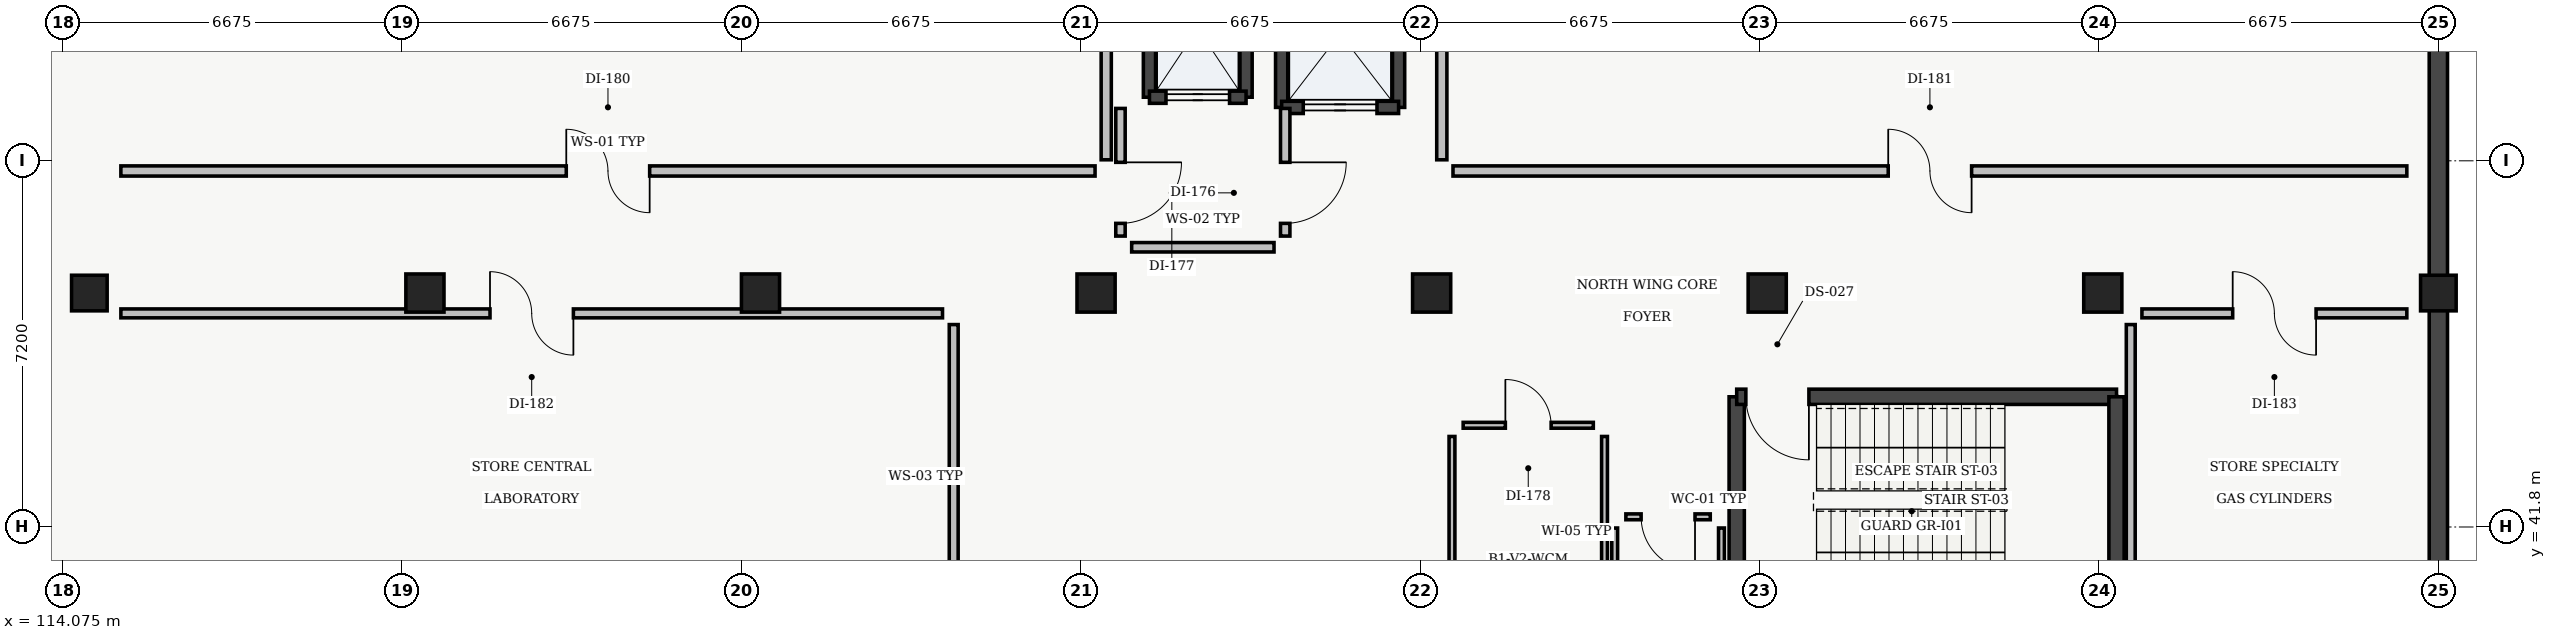
"""IFC4 building model, lengths in metres.
Left out: names, types, materials, properties, quantities, classifications, styles, units other than length and angle.
Written with IfcOpenShell. Run it as: python <this file> out.ifc"""

import sys

from ifc_helpers import new_model, si_unit, direction, frame, frame_2d, origin, origin_2d, place, context, subcontext, project, spatial, rectangle, extrude, element, fill, save


model = new_model("IFC4")
c1 = context("Model", 3, precision=1e-05, world=origin(), true_north=direction((0.0, 1.0)))
c2 = subcontext(c1, "Body", "Model", "MODEL_VIEW")
j1 = project(units=[si_unit("LENGTHUNIT", "METRE"), si_unit("PLANEANGLEUNIT", "RADIAN")], contexts=[c1])
p1 = place(None, origin())
s1 = spatial("IfcSite", under=j1, at=p1, CompositionType="ELEMENT")
p2 = place(p1, origin())
s2 = spatial("IfcBuilding", under=s1, at=p2, CompositionType="ELEMENT")
p3 = place(p2, frame((0.0, 0.0, -4.8)))
s3 = spatial("IfcBuildingStorey", under=s2, at=p3, CompositionType="ELEMENT", Elevation=-4.8)
p4 = place(p3, frame((114.6, 46.4, 0.0), z_axis=(0.0, 0.0, 1.0), x_axis=(1.0, 0.0, 0.0)))
e1 = element("IfcColumn", 1, at=p4, inside=s3, PredefinedType="COLUMN", context=c2, shape_type="SweptSolid", body=[
    extrude(rectangle(XDim=0.7, YDim=0.7, at=origin_2d()), origin(), (0.0, 0.0, 1.0), 4.59),
])
for number, where, z_axis, x_axis in (
    (2, (121.2, 46.4, 0.0), (0.0, 0.0, 1.0), (1.0, 0.0, 0.0)),
    (3, (127.8, 46.4, 0.0), (0.0, 0.0, 1.0), (1.0, 0.0, 0.0)),
    (4, (134.4, 46.4, 0.0), (0.0, 0.0, 1.0), (1.0, 0.0, 0.0)),
    (5, (141.0, 46.4, 0.0), (0.0, 0.0, 1.0), (1.0, 0.0, 0.0)),
    (6, (147.6, 46.4, 0.0), (0.0, 0.0, 1.0), (1.0, 0.0, 0.0)),
    (7, (154.2, 46.4, 0.0), (0.0, 0.0, 1.0), (1.0, 0.0, 0.0)),
):
    element("IfcColumn", number, at=place(p3, frame(where, z_axis=z_axis, x_axis=x_axis)), inside=s3, PredefinedType="COLUMN", context=c2, shape_type="SweptSolid", body=[
        extrude(rectangle(XDim=0.75, YDim=0.75, at=origin_2d()), origin(), (0.0, 0.0, 1.0), 4.59),
    ])
p5 = place(p3, frame((160.8, 46.4, 0.0), z_axis=(0.0, 0.0, 1.0), x_axis=(1.0, 0.0, 0.0)))
e8 = element("IfcColumn", 8, at=p5, inside=s3, PredefinedType="COLUMN", context=c2, shape_type="SweptSolid", body=[
    extrude(rectangle(XDim=0.7, YDim=0.7, at=origin_2d()), origin(), (0.0, 0.0, 1.0), 4.59),
])
p6 = place(p3, frame((160.8, 61.6, 0.0), z_axis=(0.0, 0.0, 1.0), x_axis=(0.0, -1.0, 0.0)))
e9 = element("IfcWall", 9, at=p6, inside=s3, PredefinedType="USERDEFINED", context=c2, shape_type="SweptSolid", body=[
    extrude(rectangle(XDim=61.4, YDim=0.36, at=frame_2d((30.7, 0.0))), origin(), (0.0, 0.0, 1.0), 4.58),
])
p7 = place(p3, frame((147.0, 40.3, 0.0), z_axis=(0.0, 0.0, 1.0), x_axis=(0.0, 1.0, 0.0)))
e10 = element("IfcWall", 10, at=p7, inside=s3, PredefinedType="SHEAR", context=c2, shape_type="SweptSolid", body=[
    extrude(rectangle(XDim=4.06, YDim=0.3, at=frame_2d((2.03, 0.0))), origin(), (0.0, 0.0, 1.0), 4.58),
])
p8 = place(p3, frame((147.0, 44.36, 0.0), z_axis=(0.0, 0.0, 1.0), x_axis=(1.0, 0.0, 0.0)))
e11 = element("IfcWall", 11, at=p8, inside=s3, PredefinedType="SHEAR", context=c2, shape_type="SweptSolid", body=[
    extrude(rectangle(XDim=7.47, YDim=0.3, at=frame_2d((3.735, 0.0))), origin(), (0.0, 0.0, 1.0), 4.58),
])
p9 = place(p8, frame((0.18, 0.0, 0.0)))
e12 = element("IfcOpeningElement", 12, at=p9, cuts=e11, PredefinedType="OPENING", context=c2, shape_type="SweptSolid", body=[
    extrude(rectangle(XDim=1.24, YDim=2.15, at=frame_2d((0.62, 1.075))), frame((0.0, 0.15, 0.0), z_axis=(0.0, -1.0, 0.0), x_axis=(1.0, 0.0, 0.0)), (0.0, 0.0, 1.0), 0.3),
])
p10 = place(p3, frame((154.47, 44.36, 0.0), z_axis=(0.0, 0.0, 1.0), x_axis=(0.0, -1.0, 0.0)))
e13 = element("IfcWall", 13, at=p10, inside=s3, PredefinedType="SHEAR", context=c2, shape_type="SweptSolid", body=[
    extrude(rectangle(XDim=4.06, YDim=0.3, at=frame_2d((2.03, 0.0))), origin(), (0.0, 0.0, 1.0), 4.58),
])
for number, where, z_axis, x_axis in (
    (14, (135.45, 50.25, 0.0), (0.0, 0.0, 1.0), (0.0, 1.0, 0.0)),
    (15, (137.35, 52.95, 0.0), (0.0, 0.0, 1.0), (0.0, -1.0, 0.0)),
):
    element("IfcWall", number, at=place(p3, frame(where, z_axis=z_axis, x_axis=x_axis)), inside=s3, PredefinedType="SHEAR", context=c2, shape_type="SweptSolid", body=[
        extrude(rectangle(XDim=2.7, YDim=0.24, at=frame_2d((1.35, 0.0))), origin(), (0.0, 0.0, 1.0), 4.58),
    ])
p11 = place(p3, frame((137.35, 50.25, 0.0), z_axis=(0.0, 0.0, 1.0), x_axis=(-1.0, 0.0, 0.0)))
e16 = element("IfcWall", 16, at=p11, inside=s3, PredefinedType="SHEAR", context=c2, shape_type="SweptSolid", body=[
    extrude(rectangle(XDim=1.9, YDim=0.24, at=frame_2d((0.95, 0.0))), origin(), (0.0, 0.0, 1.0), 4.58),
])
p12 = place(p11, frame((0.325, 0.0, 0.0)))
e17 = element("IfcOpeningElement", 17, at=p12, cuts=e16, PredefinedType="OPENING", context=c2, shape_type="SweptSolid", body=[
    extrude(rectangle(XDim=1.25, YDim=2.2, at=frame_2d((0.625, 1.1))), frame((0.0, 0.12, 0.0), z_axis=(0.0, -1.0, 0.0), x_axis=(1.0, 0.0, 0.0)), (0.0, 0.0, 1.0), 0.24),
])
for number, where, z_axis, x_axis in (
    (18, (138.05, 50.05, 0.0), (0.0, 0.0, 1.0), (0.0, 1.0, 0.0)),
    (19, (140.35, 52.95, 0.0), (0.0, 0.0, 1.0), (0.0, -1.0, 0.0)),
):
    element("IfcWall", number, at=place(p3, frame(where, z_axis=z_axis, x_axis=x_axis)), inside=s3, PredefinedType="SHEAR", context=c2, shape_type="SweptSolid", body=[
        extrude(rectangle(XDim=2.9, YDim=0.24, at=frame_2d((1.45, 0.0))), origin(), (0.0, 0.0, 1.0), 4.58),
    ])
p13 = place(p3, frame((140.35, 50.05, 0.0), z_axis=(0.0, 0.0, 1.0), x_axis=(-1.0, 0.0, 0.0)))
e20 = element("IfcWall", 20, at=p13, inside=s3, PredefinedType="SHEAR", context=c2, shape_type="SweptSolid", body=[
    extrude(rectangle(XDim=2.3, YDim=0.24, at=frame_2d((1.15, 0.0))), origin(), (0.0, 0.0, 1.0), 4.58),
])
p14 = place(p13, frame((0.425, 0.0, 0.0)))
e21 = element("IfcOpeningElement", 21, at=p14, cuts=e20, PredefinedType="OPENING", context=c2, shape_type="SweptSolid", body=[
    extrude(rectangle(XDim=1.45, YDim=2.3, at=frame_2d((0.725, 1.15))), frame((0.0, 0.12, 0.0), z_axis=(0.0, -1.0, 0.0), x_axis=(1.0, 0.0, 0.0)), (0.0, 0.0, 1.0), 0.24),
])
p15 = place(p3, frame((135.1, 47.3, 0.0), z_axis=(0.0, 0.0, 1.0), x_axis=(1.0, 0.0, 0.0)))
e22 = element("IfcWall", 22, at=p15, inside=s3, PredefinedType="SOLIDWALL", context=c2, shape_type="SweptSolid", body=[
    extrude(rectangle(XDim=2.8, YDim=0.185, at=frame_2d((1.4, 0.0))), origin(), (0.0, 0.0, 1.0), 4.25),
])
p16 = place(p3, frame((138.12, 47.52, 0.0), z_axis=(0.0, 0.0, 1.0), x_axis=(0.0, 1.0, 0.0)))
e23 = element("IfcWall", 23, at=p16, inside=s3, PredefinedType="SOLIDWALL", context=c2, shape_type="SweptSolid", body=[
    extrude(rectangle(XDim=2.51, YDim=0.185, at=frame_2d((1.255, 0.0))), origin(), (0.0, 0.0, 1.0), 4.25),
])
p17 = place(p16, frame((0.25, 0.0, 0.0)))
e24 = element("IfcOpeningElement", 24, at=p17, cuts=e23, PredefinedType="OPENING", context=c2, shape_type="SweptSolid", body=[
    extrude(rectangle(XDim=1.2, YDim=2.15, at=frame_2d((0.6, 1.075))), frame((0.0, 0.093, 0.0), z_axis=(0.0, -1.0, 0.0), x_axis=(1.0, 0.0, 0.0)), (0.0, 0.0, 1.0), 0.185),
])
p18 = place(p3, frame((134.88, 50.03, 0.0), z_axis=(0.0, 0.0, 1.0), x_axis=(0.0, -1.0, 0.0)))
e25 = element("IfcWall", 25, at=p18, inside=s3, PredefinedType="SOLIDWALL", context=c2, shape_type="SweptSolid", body=[
    extrude(rectangle(XDim=2.51, YDim=0.185, at=frame_2d((1.255, 0.0))), origin(), (0.0, 0.0, 1.0), 4.25),
])
p19 = place(p18, frame((1.06, 0.0, 0.0)))
e26 = element("IfcOpeningElement", 26, at=p19, cuts=e25, PredefinedType="OPENING", context=c2, shape_type="SweptSolid", body=[
    extrude(rectangle(XDim=1.2, YDim=2.15, at=frame_2d((0.6, 1.075))), frame((0.0, 0.093, 0.0), z_axis=(0.0, -1.0, 0.0), x_axis=(1.0, 0.0, 0.0)), (0.0, 0.0, 1.0), 0.185),
])
p20 = place(p3, frame((144.4, 39.82, 0.0), z_axis=(0.0, 0.0, 1.0), x_axis=(0.0, 1.0, 0.0)))
e27 = element("IfcWall", 27, at=p20, inside=s3, PredefinedType="PARTITIONING", context=c2, shape_type="SweptSolid", body=[
    extrude(rectangle(XDim=3.76, YDim=0.115, at=frame_2d((1.88, 0.0))), origin(), (0.0, 0.0, 1.0), 4.25),
])
p21 = place(p3, frame((144.18, 43.8, 0.0), z_axis=(0.0, 0.0, 1.0), x_axis=(-1.0, 0.0, 0.0)))
e28 = element("IfcWall", 28, at=p21, inside=s3, PredefinedType="PARTITIONING", context=c2, shape_type="SweptSolid", body=[
    extrude(rectangle(XDim=2.56, YDim=0.115, at=frame_2d((1.28, 0.0))), origin(), (0.0, 0.0, 1.0), 4.25),
])
p22 = place(p21, frame((0.83, 0.0, 0.0)))
e29 = element("IfcOpeningElement", 29, at=p22, cuts=e28, PredefinedType="OPENING", context=c2, shape_type="SweptSolid", body=[
    extrude(rectangle(XDim=0.9, YDim=2.1, at=frame_2d((0.45, 1.05))), frame((0.0, 0.058, 0.0), z_axis=(0.0, -1.0, 0.0), x_axis=(1.0, 0.0, 0.0)), (0.0, 0.0, 1.0), 0.115),
])
p23 = place(p3, frame((141.4, 43.58, 0.0), z_axis=(0.0, 0.0, 1.0), x_axis=(0.0, -1.0, 0.0)))
e30 = element("IfcWall", 30, at=p23, inside=s3, PredefinedType="PARTITIONING", context=c2, shape_type="SweptSolid", body=[
    extrude(rectangle(XDim=3.76, YDim=0.115, at=frame_2d((1.88, 0.0))), origin(), (0.0, 0.0, 1.0), 4.25),
])
p24 = place(p3, frame((146.7, 39.82, 0.0), z_axis=(0.0, 0.0, 1.0), x_axis=(0.0, 1.0, 0.0)))
e31 = element("IfcWall", 31, at=p24, inside=s3, PredefinedType="PARTITIONING", context=c2, shape_type="SweptSolid", body=[
    extrude(rectangle(XDim=1.96, YDim=0.115, at=frame_2d((0.98, 0.0))), origin(), (0.0, 0.0, 1.0), 4.25),
])
p25 = place(p3, frame((146.48, 42.0, 0.0), z_axis=(0.0, 0.0, 1.0), x_axis=(-1.0, 0.0, 0.0)))
e32 = element("IfcWall", 32, at=p25, inside=s3, PredefinedType="PARTITIONING", context=c2, shape_type="SweptSolid", body=[
    extrude(rectangle(XDim=1.66, YDim=0.115, at=frame_2d((0.83, 0.0))), origin(), (0.0, 0.0, 1.0), 4.25),
])
p26 = place(p25, frame((0.3, 0.0, 0.0)))
e33 = element("IfcOpeningElement", 33, at=p26, cuts=e32, PredefinedType="OPENING", context=c2, shape_type="SweptSolid", body=[
    extrude(rectangle(XDim=1.06, YDim=2.12, at=frame_2d((0.53, 1.06))), frame((0.0, 0.058, 0.0), z_axis=(0.0, -1.0, 0.0), x_axis=(1.0, 0.0, 0.0)), (0.0, 0.0, 1.0), 0.115),
])
p27 = place(p3, frame((144.6, 41.78, 0.0), z_axis=(0.0, 0.0, 1.0), x_axis=(0.0, -1.0, 0.0)))
e34 = element("IfcWall", 34, at=p27, inside=s3, PredefinedType="PARTITIONING", context=c2, shape_type="SweptSolid", body=[
    extrude(rectangle(XDim=1.96, YDim=0.115, at=frame_2d((0.98, 0.0))), origin(), (0.0, 0.0, 1.0), 4.25),
])
p28 = place(p3, frame((115.22, 48.8, 0.0), z_axis=(0.0, 0.0, 1.0), x_axis=(1.0, 0.0, 0.0)))
e35 = element("IfcWall", 35, at=p28, inside=s3, PredefinedType="SOLIDWALL", context=c2, shape_type="SweptSolid", body=[
    extrude(rectangle(XDim=19.16, YDim=0.2, at=frame_2d((9.58, 0.0))), origin(), (0.0, 0.0, 1.0), 4.125),
])
p29 = place(p28, frame((8.76, 0.0, 0.0)))
e36 = element("IfcOpeningElement", 36, at=p29, cuts=e35, PredefinedType="OPENING", context=c2, shape_type="SweptSolid", body=[
    extrude(rectangle(XDim=1.64, YDim=2.2, at=frame_2d((0.82, 1.1))), frame((0.0, 0.1, 0.0), z_axis=(0.0, -1.0, 0.0), x_axis=(1.0, 0.0, 0.0)), (0.0, 0.0, 1.0), 0.2),
])
p30 = place(p3, frame((134.6, 49.02, 0.0), z_axis=(0.0, 0.0, 1.0), x_axis=(0.0, 1.0, 0.0)))
e37 = element("IfcWall", 37, at=p30, inside=s3, PredefinedType="SOLIDWALL", context=c2, shape_type="SweptSolid", body=[
    extrude(rectangle(XDim=11.16, YDim=0.2, at=frame_2d((5.58, 0.0))), origin(), (0.0, 0.0, 1.0), 3.925),
])
p31 = place(p3, frame((141.42, 48.8, 0.0), z_axis=(0.0, 0.0, 1.0), x_axis=(1.0, 0.0, 0.0)))
e38 = element("IfcWall", 38, at=p31, inside=s3, PredefinedType="SOLIDWALL", context=c2, shape_type="SweptSolid", body=[
    extrude(rectangle(XDim=18.76, YDim=0.2, at=frame_2d((9.38, 0.0))), origin(), (0.0, 0.0, 1.0), 4.125),
])
p32 = place(p31, frame((8.56, 0.0, 0.0)))
e39 = element("IfcOpeningElement", 39, at=p32, cuts=e38, PredefinedType="OPENING", context=c2, shape_type="SweptSolid", body=[
    extrude(rectangle(XDim=1.64, YDim=2.2, at=frame_2d((0.82, 1.1))), frame((0.0, 0.1, 0.0), z_axis=(0.0, -1.0, 0.0), x_axis=(1.0, 0.0, 0.0)), (0.0, 0.0, 1.0), 0.2),
])
p33 = place(p3, frame((141.2, 60.18, 0.0), z_axis=(0.0, 0.0, 1.0), x_axis=(0.0, -1.0, 0.0)))
e40 = element("IfcWall", 40, at=p33, inside=s3, PredefinedType="SOLIDWALL", context=c2, shape_type="SweptSolid", body=[
    extrude(rectangle(XDim=11.16, YDim=0.2, at=frame_2d((5.58, 0.0))), origin(), (0.0, 0.0, 1.0), 3.925),
])
p34 = place(p3, frame((131.6, 39.82, 0.0), z_axis=(0.0, 0.0, 1.0), x_axis=(0.0, 1.0, 0.0)))
e41 = element("IfcWall", 41, at=p34, inside=s3, PredefinedType="SOLIDWALL", context=c2, shape_type="SweptSolid", body=[
    extrude(rectangle(XDim=5.96, YDim=0.175, at=frame_2d((2.98, 0.0))), origin(), (0.0, 0.0, 1.0), 4.25),
])
p35 = place(p3, frame((131.38, 46.0, 0.0), z_axis=(0.0, 0.0, 1.0), x_axis=(-1.0, 0.0, 0.0)))
e42 = element("IfcWall", 42, at=p35, inside=s3, PredefinedType="SOLIDWALL", context=c2, shape_type="SweptSolid", body=[
    extrude(rectangle(XDim=16.16, YDim=0.175, at=frame_2d((8.08, 0.0))), origin(), (0.0, 0.0, 1.0), 4.25),
])
p36 = place(p35, frame((7.26, 0.0, 0.0)))
e43 = element("IfcOpeningElement", 43, at=p36, cuts=e42, PredefinedType="OPENING", context=c2, shape_type="SweptSolid", body=[
    extrude(rectangle(XDim=1.64, YDim=2.2, at=frame_2d((0.82, 1.1))), frame((0.0, 0.087, 0.0), z_axis=(0.0, -1.0, 0.0), x_axis=(1.0, 0.0, 0.0)), (0.0, 0.0, 1.0), 0.175),
])
p37 = place(p3, frame((160.18, 46.0, 0.0), z_axis=(0.0, 0.0, 1.0), x_axis=(-1.0, 0.0, 0.0)))
e44 = element("IfcWall", 44, at=p37, inside=s3, PredefinedType="SOLIDWALL", context=c2, shape_type="SweptSolid", body=[
    extrude(rectangle(XDim=5.21, YDim=0.175, at=frame_2d((2.605, 0.0))), origin(), (0.0, 0.0, 1.0), 4.25),
])
p38 = place(p37, frame((1.785, 0.0, 0.0)))
e45 = element("IfcOpeningElement", 45, at=p38, cuts=e44, PredefinedType="OPENING", context=c2, shape_type="SweptSolid", body=[
    extrude(rectangle(XDim=1.64, YDim=2.2, at=frame_2d((0.82, 1.1))), frame((0.0, 0.087, 0.0), z_axis=(0.0, -1.0, 0.0), x_axis=(1.0, 0.0, 0.0)), (0.0, 0.0, 1.0), 0.175),
])
p39 = place(p3, frame((154.75, 45.78, 0.0), z_axis=(0.0, 0.0, 1.0), x_axis=(0.0, -1.0, 0.0)))
e46 = element("IfcWall", 46, at=p39, inside=s3, PredefinedType="SOLIDWALL", context=c2, shape_type="SweptSolid", body=[
    extrude(rectangle(XDim=5.96, YDim=0.175, at=frame_2d((2.98, 0.0))), origin(), (0.0, 0.0, 1.0), 4.25),
])
p40 = place(p9, origin())
e47 = element("IfcDoor", 47, at=p40, inside=s3, OperationType="SINGLE_SWING_RIGHT", PredefinedType="DOOR", context=c2, shape_type="SweptSolid", body=[
    extrude(rectangle(XDim=1.24, YDim=2.15, at=frame_2d((0.62, 1.075))), frame((0.0, 0.025, 0.0), z_axis=(0.0, -1.0, 0.0), x_axis=(1.0, 0.0, 0.0)), (0.0, 0.0, 1.0), 0.05),
])
fill(e12, e47)
p41 = place(p12, origin())
e48 = element("IfcDoor", 48, at=p41, inside=s3, OperationType="SLIDING_TO_RIGHT", PredefinedType="DOOR", context=c2, shape_type="SweptSolid", body=[
    extrude(rectangle(XDim=1.25, YDim=2.2, at=frame_2d((0.625, 1.1))), frame((0.0, 0.025, 0.0), z_axis=(0.0, -1.0, 0.0), x_axis=(1.0, 0.0, 0.0)), (0.0, 0.0, 1.0), 0.05),
])
fill(e17, e48)
p42 = place(p14, origin())
e49 = element("IfcDoor", 49, at=p42, inside=s3, OperationType="DOUBLE_DOOR_SLIDING", PredefinedType="DOOR", context=c2, shape_type="SweptSolid", body=[
    extrude(rectangle(XDim=1.45, YDim=2.3, at=frame_2d((0.725, 1.15))), frame((0.0, 0.025, 0.0), z_axis=(0.0, -1.0, 0.0), x_axis=(1.0, 0.0, 0.0)), (0.0, 0.0, 1.0), 0.05),
])
fill(e21, e49)
p43 = place(p17, origin())
e50 = element("IfcDoor", 50, at=p43, inside=s3, OperationType="SINGLE_SWING_RIGHT", PredefinedType="DOOR", context=c2, shape_type="SweptSolid", body=[
    extrude(rectangle(XDim=1.2, YDim=2.15, at=frame_2d((0.6, 1.075))), frame((0.0, 0.025, 0.0), z_axis=(0.0, -1.0, 0.0), x_axis=(1.0, 0.0, 0.0)), (0.0, 0.0, 1.0), 0.05),
])
fill(e24, e50)
p44 = place(p19, origin())
e51 = element("IfcDoor", 51, at=p44, inside=s3, OperationType="SINGLE_SWING_LEFT", PredefinedType="DOOR", context=c2, shape_type="SweptSolid", body=[
    extrude(rectangle(XDim=1.2, YDim=2.15, at=frame_2d((0.6, 1.075))), frame((0.0, 0.025, 0.0), z_axis=(0.0, -1.0, 0.0), x_axis=(1.0, 0.0, 0.0)), (0.0, 0.0, 1.0), 0.05),
])
fill(e26, e51)
p45 = place(p22, origin())
e52 = element("IfcDoor", 52, at=p45, inside=s3, OperationType="SINGLE_SWING_RIGHT", PredefinedType="DOOR", context=c2, shape_type="SweptSolid", body=[
    extrude(rectangle(XDim=0.9, YDim=2.1, at=frame_2d((0.45, 1.05))), frame((0.0, 0.025, 0.0), z_axis=(0.0, -1.0, 0.0), x_axis=(1.0, 0.0, 0.0)), (0.0, 0.0, 1.0), 0.05),
])
fill(e29, e52)
p46 = place(p26, origin())
e53 = element("IfcDoor", 53, at=p46, inside=s3, OperationType="SINGLE_SWING_LEFT", PredefinedType="DOOR", context=c2, shape_type="SweptSolid", body=[
    extrude(rectangle(XDim=1.06, YDim=2.12, at=frame_2d((0.53, 1.06))), frame((0.0, 0.025, 0.0), z_axis=(0.0, -1.0, 0.0), x_axis=(1.0, 0.0, 0.0)), (0.0, 0.0, 1.0), 0.05),
])
fill(e33, e53)
p47 = place(p29, origin())
e54 = element("IfcDoor", 54, at=p47, inside=s3, OperationType="DOUBLE_DOOR_SINGLE_SWING", PredefinedType="DOOR", context=c2, shape_type="SweptSolid", body=[
    extrude(rectangle(XDim=1.64, YDim=2.2, at=frame_2d((0.82, 1.1))), frame((0.0, 0.025, 0.0), z_axis=(0.0, -1.0, 0.0), x_axis=(1.0, 0.0, 0.0)), (0.0, 0.0, 1.0), 0.05),
])
fill(e36, e54)
p48 = place(p32, origin())
e55 = element("IfcDoor", 55, at=p48, inside=s3, OperationType="DOUBLE_DOOR_SINGLE_SWING", PredefinedType="DOOR", context=c2, shape_type="SweptSolid", body=[
    extrude(rectangle(XDim=1.64, YDim=2.2, at=frame_2d((0.82, 1.1))), frame((0.0, 0.025, 0.0), z_axis=(0.0, -1.0, 0.0), x_axis=(1.0, 0.0, 0.0)), (0.0, 0.0, 1.0), 0.05),
])
fill(e39, e55)
p49 = place(p36, origin())
e56 = element("IfcDoor", 56, at=p49, inside=s3, OperationType="DOUBLE_DOOR_SINGLE_SWING", PredefinedType="DOOR", context=c2, shape_type="SweptSolid", body=[
    extrude(rectangle(XDim=1.64, YDim=2.2, at=frame_2d((0.82, 1.1))), frame((0.0, 0.025, 0.0), z_axis=(0.0, -1.0, 0.0), x_axis=(1.0, 0.0, 0.0)), (0.0, 0.0, 1.0), 0.05),
])
fill(e43, e56)
p50 = place(p38, origin())
e57 = element("IfcDoor", 57, at=p50, inside=s3, OperationType="DOUBLE_DOOR_SINGLE_SWING", PredefinedType="DOOR", context=c2, shape_type="SweptSolid", body=[
    extrude(rectangle(XDim=1.64, YDim=2.2, at=frame_2d((0.82, 1.1))), frame((0.0, 0.025, 0.0), z_axis=(0.0, -1.0, 0.0), x_axis=(1.0, 0.0, 0.0)), (0.0, 0.0, 1.0), 0.05),
])
fill(e45, e57)
save(model, sys.argv[1])
